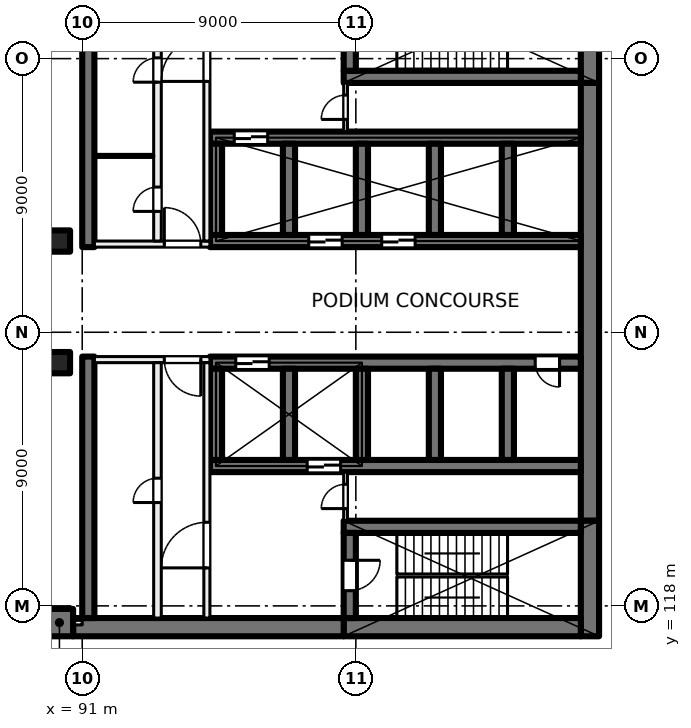
"""IFC4 building model, lengths in metres.
Left out: names, types, materials, properties, quantities, classifications, styles, units other than length and angle.
Written with IfcOpenShell. Run it as: python <this file> out.ifc"""

import sys

from ifc_helpers import new_model, si_unit, direction, frame, frame_2d, origin, origin_2d, place, context, subcontext, project, spatial, rectangle, extrude, element, fill, save


model = new_model("IFC4")
c1 = context("Model", 3, precision=1e-05, world=origin(), true_north=direction((0.0, 1.0)))
c2 = subcontext(c1, "Body", "Model", "MODEL_VIEW")
j1 = project(units=[si_unit("LENGTHUNIT", "METRE"), si_unit("PLANEANGLEUNIT", "RADIAN")], contexts=[c1])
p1 = place(None, origin())
s1 = spatial("IfcSite", under=j1, at=p1, CompositionType="ELEMENT")
p2 = place(p1, origin())
s2 = spatial("IfcBuilding", under=s1, at=p2, CompositionType="ELEMENT")
p3 = place(p2, frame((0.0, 0.0, 12.5)))
s3 = spatial("IfcBuildingStorey", under=s2, at=p3, CompositionType="ELEMENT", Elevation=12.5)
for number, where, z_axis, x_axis in (
    (1, (90.25, 130.0, 0.0), (0.0, 0.0, 1.0), (1.0, 0.0, 0.0)),
    (2, (90.25, 126.0, 0.0), (0.0, 0.0, 1.0), (1.0, 0.0, 0.0)),
):
    element("IfcColumn", number, at=place(p3, frame(where, z_axis=z_axis, x_axis=x_axis)), inside=s3, PredefinedType="COLUMN", context=c2, shape_type="SweptSolid", body=[
        extrude(rectangle(XDim=0.7, YDim=0.7, at=origin_2d()), origin(), (0.0, 0.0, 1.0), 5.0),
    ])
p4 = place(p3, frame((90.25, 117.45, 0.0), z_axis=(0.0, 0.0, 1.0), x_axis=(1.0, 0.0, 0.0)))
e3 = element("IfcColumn", 3, at=p4, inside=s3, PredefinedType="COLUMN", context=c2, shape_type="SweptSolid", body=[
    extrude(rectangle(XDim=0.9, YDim=0.9, at=origin_2d()), origin(), (0.0, 0.0, 1.0), 5.0),
])
p5 = place(p3, frame((107.7, 139.0, 0.0), z_axis=(0.0, 0.0, 1.0), x_axis=(0.0, -1.0, 0.0)))
e4 = element("IfcWall", 4, at=p5, inside=s3, PredefinedType="SHEAR", context=c2, shape_type="SweptSolid", body=[
    extrude(rectangle(XDim=3.8, YDim=0.6, at=frame_2d((1.9, 0.0))), origin(), (0.0, 0.0, 1.0), 5.0),
])
p6 = place(p3, frame((107.7, 135.2, 0.0), z_axis=(0.0, 0.0, 1.0), x_axis=(0.0, -1.0, 0.0)))
e5 = element("IfcWall", 5, at=p6, inside=s3, PredefinedType="SHEAR", context=c2, shape_type="SweptSolid", body=[
    extrude(rectangle(XDim=14.4, YDim=0.6, at=frame_2d((7.2, 0.0))), origin(), (0.0, 0.0, 1.0), 5.0),
])
p7 = place(p3, frame((107.7, 120.8, 0.0), z_axis=(0.0, 0.0, 1.0), x_axis=(0.0, -1.0, 0.0)))
e6 = element("IfcWall", 6, at=p7, inside=s3, PredefinedType="SHEAR", context=c2, shape_type="SweptSolid", body=[
    extrude(rectangle(XDim=3.8, YDim=0.6, at=frame_2d((1.9, 0.0))), origin(), (0.0, 0.0, 1.0), 5.0),
])
p8 = place(p3, frame((107.4, 117.3, 0.0), z_axis=(0.0, 0.0, 1.0), x_axis=(-1.0, 0.0, 0.0)))
e7 = element("IfcWall", 7, at=p8, inside=s3, PredefinedType="SHEAR", context=c2, shape_type="SweptSolid", body=[
    extrude(rectangle(XDim=7.8, YDim=0.6, at=frame_2d((3.9, 0.0))), origin(), (0.0, 0.0, 1.0), 5.0),
])
p9 = place(p3, frame((99.6, 117.3, 0.0), z_axis=(0.0, 0.0, 1.0), x_axis=(-1.0, 0.0, 0.0)))
e8 = element("IfcWall", 8, at=p9, inside=s3, PredefinedType="SHEAR", context=c2, shape_type="SweptSolid", body=[
    extrude(rectangle(XDim=8.9, YDim=0.6, at=frame_2d((4.45, 0.0))), origin(), (0.0, 0.0, 1.0), 5.0),
])
p10 = place(p3, frame((107.4, 135.4, 0.0), z_axis=(0.0, 0.0, 1.0), x_axis=(-1.0, 0.0, 0.0)))
e9 = element("IfcWall", 9, at=p10, inside=s3, PredefinedType="SHEAR", context=c2, shape_type="SweptSolid", body=[
    extrude(rectangle(XDim=7.8, YDim=0.4, at=frame_2d((3.9, 0.0))), origin(), (0.0, 0.0, 1.0), 5.0),
])
p11 = place(p3, frame((99.8, 138.4, 0.0), z_axis=(0.0, 0.0, 1.0), x_axis=(0.0, -1.0, 0.0)))
e10 = element("IfcWall", 10, at=p11, inside=s3, PredefinedType="SHEAR", context=c2, shape_type="SweptSolid", body=[
    extrude(rectangle(XDim=2.8, YDim=0.4, at=frame_2d((1.4, 0.0))), origin(), (0.0, 0.0, 1.0), 5.0),
])
p12 = place(p11, frame((0.9, 0.0, 0.0)))
e11 = element("IfcOpeningElement", 11, at=p12, cuts=e10, PredefinedType="OPENING", context=c2, shape_type="SweptSolid", body=[
    extrude(rectangle(XDim=1.0, YDim=2.1, at=frame_2d((0.5, 1.05))), frame((0.0, 0.21, 0.0), z_axis=(0.0, -1.0, 0.0), x_axis=(1.0, 0.0, 0.0)), (0.0, 0.0, 1.0), 0.42),
])
p13 = place(p3, frame((107.4, 120.6, 0.0), z_axis=(0.0, 0.0, 1.0), x_axis=(-1.0, 0.0, 0.0)))
e12 = element("IfcWall", 12, at=p13, inside=s3, PredefinedType="SHEAR", context=c2, shape_type="SweptSolid", body=[
    extrude(rectangle(XDim=7.8, YDim=0.4, at=frame_2d((3.9, 0.0))), origin(), (0.0, 0.0, 1.0), 5.0),
])
p14 = place(p3, frame((99.8, 120.4, 0.0), z_axis=(0.0, 0.0, 1.0), x_axis=(0.0, -1.0, 0.0)))
e13 = element("IfcWall", 13, at=p14, inside=s3, PredefinedType="SHEAR", context=c2, shape_type="SweptSolid", body=[
    extrude(rectangle(XDim=2.8, YDim=0.4, at=frame_2d((1.4, 0.0))), origin(), (0.0, 0.0, 1.0), 5.0),
])
p15 = place(p14, frame((0.9, 0.0, 0.0)))
e14 = element("IfcOpeningElement", 14, at=p15, cuts=e13, PredefinedType="OPENING", context=c2, shape_type="SweptSolid", body=[
    extrude(rectangle(XDim=1.0, YDim=2.1, at=frame_2d((0.5, 1.05))), frame((0.0, 0.21, 0.0), z_axis=(0.0, -1.0, 0.0), x_axis=(1.0, 0.0, 0.0)), (0.0, 0.0, 1.0), 0.42),
])
p16 = place(p3, frame((107.4, 130.0, 0.0), z_axis=(0.0, 0.0, 1.0), x_axis=(-1.0, 0.0, 0.0)))
e15 = element("IfcWall", 15, at=p16, inside=s3, PredefinedType="SHEAR", context=c2, shape_type="SweptSolid", body=[
    extrude(rectangle(XDim=12.2, YDim=0.4, at=frame_2d((6.1, 0.0))), origin(), (0.0, 0.0, 1.0), 5.0),
])
p17 = place(p16, frame((5.45, 0.0, 0.0)))
e16 = element("IfcOpeningElement", 16, at=p17, cuts=e15, PredefinedType="OPENING", context=c2, shape_type="SweptSolid", body=[
    extrude(rectangle(XDim=1.1, YDim=2.1, at=frame_2d((0.55, 1.05))), frame((0.0, 0.21, 0.0), z_axis=(0.0, -1.0, 0.0), x_axis=(1.0, 0.0, 0.0)), (0.0, 0.0, 1.0), 0.42),
])
p18 = place(p16, frame((7.85, 0.0, 0.0)))
e17 = element("IfcOpeningElement", 17, at=p18, cuts=e15, PredefinedType="OPENING", context=c2, shape_type="SweptSolid", body=[
    extrude(rectangle(XDim=1.1, YDim=2.1, at=frame_2d((0.55, 1.05))), frame((0.0, 0.21, 0.0), z_axis=(0.0, -1.0, 0.0), x_axis=(1.0, 0.0, 0.0)), (0.0, 0.0, 1.0), 0.42),
])
p19 = place(p3, frame((107.4, 133.4, 0.0), z_axis=(0.0, 0.0, 1.0), x_axis=(-1.0, 0.0, 0.0)))
e18 = element("IfcWall", 18, at=p19, inside=s3, PredefinedType="SHEAR", context=c2, shape_type="SweptSolid", body=[
    extrude(rectangle(XDim=12.2, YDim=0.4, at=frame_2d((6.1, 0.0))), origin(), (0.0, 0.0, 1.0), 5.0),
])
p20 = place(p19, frame((10.3, 0.0, 0.0)))
e19 = element("IfcOpeningElement", 19, at=p20, cuts=e18, PredefinedType="OPENING", context=c2, shape_type="SweptSolid", body=[
    extrude(rectangle(XDim=1.1, YDim=2.1, at=frame_2d((0.55, 1.05))), frame((0.0, 0.21, 0.0), z_axis=(0.0, -1.0, 0.0), x_axis=(1.0, 0.0, 0.0)), (0.0, 0.0, 1.0), 0.42),
])
for number, where, z_axis, x_axis in (
    (20, (105.0, 133.2, 0.0), (0.0, 0.0, 1.0), (0.0, -1.0, 0.0)),
    (21, (102.6, 133.2, 0.0), (0.0, 0.0, 1.0), (0.0, -1.0, 0.0)),
    (22, (100.2, 133.2, 0.0), (0.0, 0.0, 1.0), (0.0, -1.0, 0.0)),
    (23, (97.8, 133.2, 0.0), (0.0, 0.0, 1.0), (0.0, -1.0, 0.0)),
    (24, (95.4, 133.2, 0.0), (0.0, 0.0, 1.0), (0.0, -1.0, 0.0)),
):
    element("IfcWall", number, at=place(p3, frame(where, z_axis=z_axis, x_axis=x_axis)), inside=s3, PredefinedType="SHEAR", context=c2, shape_type="SweptSolid", body=[
        extrude(rectangle(XDim=3.0, YDim=0.4, at=frame_2d((1.5, 0.0))), origin(), (0.0, 0.0, 1.0), 5.0),
    ])
p21 = place(p3, frame((107.4, 126.0, 0.0), z_axis=(0.0, 0.0, 1.0), x_axis=(-1.0, 0.0, 0.0)))
e25 = element("IfcWall", 25, at=p21, inside=s3, PredefinedType="SHEAR", context=c2, shape_type="SweptSolid", body=[
    extrude(rectangle(XDim=12.2, YDim=0.4, at=frame_2d((6.1, 0.0))), origin(), (0.0, 0.0, 1.0), 5.0),
])
p22 = place(p21, frame((10.25, 0.0, 0.0)))
e26 = element("IfcOpeningElement", 26, at=p22, cuts=e25, PredefinedType="OPENING", context=c2, shape_type="SweptSolid", body=[
    extrude(rectangle(XDim=1.1, YDim=2.1, at=frame_2d((0.55, 1.05))), frame((0.0, 0.21, 0.0), z_axis=(0.0, -1.0, 0.0), x_axis=(1.0, 0.0, 0.0)), (0.0, 0.0, 1.0), 0.42),
])
p23 = place(p21, frame((0.7, 0.0, 0.0)))
e27 = element("IfcOpeningElement", 27, at=p23, cuts=e25, PredefinedType="OPENING", context=c2, shape_type="SweptSolid", body=[
    extrude(rectangle(XDim=0.8, YDim=2.1, at=frame_2d((0.4, 1.05))), frame((0.0, 0.21, 0.0), z_axis=(0.0, -1.0, 0.0), x_axis=(1.0, 0.0, 0.0)), (0.0, 0.0, 1.0), 0.42),
])
p24 = place(p3, frame((107.4, 122.6, 0.0), z_axis=(0.0, 0.0, 1.0), x_axis=(-1.0, 0.0, 0.0)))
e28 = element("IfcWall", 28, at=p24, inside=s3, PredefinedType="SHEAR", context=c2, shape_type="SweptSolid", body=[
    extrude(rectangle(XDim=12.2, YDim=0.4, at=frame_2d((6.1, 0.0))), origin(), (0.0, 0.0, 1.0), 5.0),
])
p25 = place(p24, frame((7.9, 0.0, 0.0)))
e29 = element("IfcOpeningElement", 29, at=p25, cuts=e28, PredefinedType="OPENING", context=c2, shape_type="SweptSolid", body=[
    extrude(rectangle(XDim=1.1, YDim=2.1, at=frame_2d((0.55, 1.05))), frame((0.0, 0.21, 0.0), z_axis=(0.0, -1.0, 0.0), x_axis=(1.0, 0.0, 0.0)), (0.0, 0.0, 1.0), 0.42),
])
for number, where, z_axis, x_axis in (
    (30, (105.0, 125.8, 0.0), (0.0, 0.0, 1.0), (0.0, -1.0, 0.0)),
    (31, (102.6, 125.8, 0.0), (0.0, 0.0, 1.0), (0.0, -1.0, 0.0)),
    (32, (100.2, 125.8, 0.0), (0.0, 0.0, 1.0), (0.0, -1.0, 0.0)),
    (33, (97.8, 125.8, 0.0), (0.0, 0.0, 1.0), (0.0, -1.0, 0.0)),
    (34, (95.4, 125.8, 0.0), (0.0, 0.0, 1.0), (0.0, -1.0, 0.0)),
):
    element("IfcWall", number, at=place(p3, frame(where, z_axis=z_axis, x_axis=x_axis)), inside=s3, PredefinedType="SHEAR", context=c2, shape_type="SweptSolid", body=[
        extrude(rectangle(XDim=3.0, YDim=0.4, at=frame_2d((1.5, 0.0))), origin(), (0.0, 0.0, 1.0), 5.0),
    ])
for number, where, z_axis, x_axis in (
    (35, (91.2, 138.4, 0.0), (0.0, 0.0, 1.0), (0.0, -1.0, 0.0)),
    (36, (91.2, 126.2, 0.0), (0.0, 0.0, 1.0), (0.0, -1.0, 0.0)),
):
    element("IfcWall", number, at=place(p3, frame(where, z_axis=z_axis, x_axis=x_axis)), inside=s3, PredefinedType="SHEAR", context=c2, shape_type="SweptSolid", body=[
        extrude(rectangle(XDim=8.6, YDim=0.4, at=frame_2d((4.3, 0.0))), origin(), (0.0, 0.0, 1.0), 5.0),
    ])
p26 = place(p3, frame((95.2, 126.1, 0.0), z_axis=(0.0, 0.0, 1.0), x_axis=(-1.0, 0.0, 0.0)))
e37 = element("IfcWall", 37, at=p26, inside=s3, PredefinedType="PARTITIONING", context=c2, shape_type="SweptSolid", body=[
    extrude(rectangle(XDim=3.8, YDim=0.2, at=frame_2d((1.9, 0.0))), origin(), (0.0, 0.0, 1.0), 4.6),
])
p27 = place(p26, frame((0.3, 0.0, 0.0)))
e38 = element("IfcOpeningElement", 38, at=p27, cuts=e37, PredefinedType="OPENING", context=c2, shape_type="SweptSolid", body=[
    extrude(rectangle(XDim=1.2, YDim=2.1, at=frame_2d((0.6, 1.05))), frame((0.0, 0.11, 0.0), z_axis=(0.0, -1.0, 0.0), x_axis=(1.0, 0.0, 0.0)), (0.0, 0.0, 1.0), 0.22),
])
p28 = place(p3, frame((95.1, 117.6, 0.0), z_axis=(0.0, 0.0, 1.0), x_axis=(0.0, 1.0, 0.0)))
e39 = element("IfcWall", 39, at=p28, inside=s3, PredefinedType="PARTITIONING", context=c2, shape_type="SweptSolid", body=[
    extrude(rectangle(XDim=8.4, YDim=0.2, at=frame_2d((4.2, 0.0))), origin(), (0.0, 0.0, 1.0), 4.6),
])
p29 = place(p28, frame((1.65, 0.0, 0.0)))
e40 = element("IfcOpeningElement", 40, at=p29, cuts=e39, PredefinedType="OPENING", context=c2, shape_type="SweptSolid", body=[
    extrude(rectangle(XDim=1.5, YDim=2.1, at=frame_2d((0.75, 1.05))), frame((0.0, 0.11, 0.0), z_axis=(0.0, -1.0, 0.0), x_axis=(1.0, 0.0, 0.0)), (0.0, 0.0, 1.0), 0.22),
])
p30 = place(p3, frame((93.475, 117.6, 0.0), z_axis=(0.0, 0.0, 1.0), x_axis=(0.0, 1.0, 0.0)))
e41 = element("IfcWall", 41, at=p30, inside=s3, PredefinedType="PARTITIONING", context=c2, shape_type="SweptSolid", body=[
    extrude(rectangle(XDim=8.4, YDim=0.25, at=frame_2d((4.2, 0.0))), origin(), (0.0, 0.0, 1.0), 4.6),
])
p31 = place(p30, frame((3.8, 0.0, 0.0)))
e42 = element("IfcOpeningElement", 42, at=p31, cuts=e41, PredefinedType="OPENING", context=c2, shape_type="SweptSolid", body=[
    extrude(rectangle(XDim=0.8, YDim=2.1, at=frame_2d((0.4, 1.05))), frame((0.0, 0.135, 0.0), z_axis=(0.0, -1.0, 0.0), x_axis=(1.0, 0.0, 0.0)), (0.0, 0.0, 1.0), 0.27),
])
p32 = place(p3, frame((99.663, 120.8, 0.0), z_axis=(0.0, 0.0, 1.0), x_axis=(0.0, 1.0, 0.0)))
e43 = element("IfcWall", 43, at=p32, inside=s3, PredefinedType="PARTITIONING", context=c2, shape_type="SweptSolid", body=[
    extrude(rectangle(XDim=1.6, YDim=0.125, at=frame_2d((0.8, 0.0))), origin(), (0.0, 0.0, 1.0), 4.6),
])
p33 = place(p32, frame((0.4, 0.0, 0.0)))
e44 = element("IfcOpeningElement", 44, at=p33, cuts=e43, PredefinedType="OPENING", context=c2, shape_type="SweptSolid", body=[
    extrude(rectangle(XDim=0.8, YDim=2.1, at=frame_2d((0.4, 1.05))), frame((0.0, 0.073, 0.0), z_axis=(0.0, -1.0, 0.0), x_axis=(1.0, 0.0, 0.0)), (0.0, 0.0, 1.0), 0.145),
])
p34 = place(p3, frame((91.4, 129.9, 0.0), z_axis=(0.0, 0.0, 1.0), x_axis=(1.0, 0.0, 0.0)))
e45 = element("IfcWall", 45, at=p34, inside=s3, PredefinedType="PARTITIONING", context=c2, shape_type="SweptSolid", body=[
    extrude(rectangle(XDim=3.8, YDim=0.2, at=frame_2d((1.9, 0.0))), origin(), (0.0, 0.0, 1.0), 4.6),
])
p35 = place(p34, frame((2.3, 0.0, 0.0)))
e46 = element("IfcOpeningElement", 46, at=p35, cuts=e45, PredefinedType="OPENING", context=c2, shape_type="SweptSolid", body=[
    extrude(rectangle(XDim=1.2, YDim=2.1, at=frame_2d((0.6, 1.05))), frame((0.0, 0.11, 0.0), z_axis=(0.0, -1.0, 0.0), x_axis=(1.0, 0.0, 0.0)), (0.0, 0.0, 1.0), 0.22),
])
p36 = place(p3, frame((95.1, 130.0, 0.0), z_axis=(0.0, 0.0, 1.0), x_axis=(0.0, 1.0, 0.0)))
e47 = element("IfcWall", 47, at=p36, inside=s3, PredefinedType="PARTITIONING", context=c2, shape_type="SweptSolid", body=[
    extrude(rectangle(XDim=8.4, YDim=0.2, at=frame_2d((4.2, 0.0))), origin(), (0.0, 0.0, 1.0), 4.6),
])
p37 = place(p36, frame((5.25, 0.0, 0.0)))
e48 = element("IfcOpeningElement", 48, at=p37, cuts=e47, PredefinedType="OPENING", context=c2, shape_type="SweptSolid", body=[
    extrude(rectangle(XDim=1.5, YDim=2.1, at=frame_2d((0.75, 1.05))), frame((0.0, 0.11, 0.0), z_axis=(0.0, -1.0, 0.0), x_axis=(1.0, 0.0, 0.0)), (0.0, 0.0, 1.0), 0.22),
])
p38 = place(p3, frame((93.475, 130.0, 0.0), z_axis=(0.0, 0.0, 1.0), x_axis=(0.0, 1.0, 0.0)))
e49 = element("IfcWall", 49, at=p38, inside=s3, PredefinedType="PARTITIONING", context=c2, shape_type="SweptSolid", body=[
    extrude(rectangle(XDim=8.4, YDim=0.25, at=frame_2d((4.2, 0.0))), origin(), (0.0, 0.0, 1.0), 4.6),
])
p39 = place(p38, frame((0.975, 0.0, 0.0)))
e50 = element("IfcOpeningElement", 50, at=p39, cuts=e49, PredefinedType="OPENING", context=c2, shape_type="SweptSolid", body=[
    extrude(rectangle(XDim=0.8, YDim=2.1, at=frame_2d((0.4, 1.05))), frame((0.0, 0.135, 0.0), z_axis=(0.0, -1.0, 0.0), x_axis=(1.0, 0.0, 0.0)), (0.0, 0.0, 1.0), 0.27),
])
p40 = place(p38, frame((5.225, 0.0, 0.0)))
e51 = element("IfcOpeningElement", 51, at=p40, cuts=e49, PredefinedType="OPENING", context=c2, shape_type="SweptSolid", body=[
    extrude(rectangle(XDim=0.8, YDim=2.1, at=frame_2d((0.4, 1.05))), frame((0.0, 0.135, 0.0), z_axis=(0.0, -1.0, 0.0), x_axis=(1.0, 0.0, 0.0)), (0.0, 0.0, 1.0), 0.27),
])
p41 = place(p3, frame((99.663, 133.6, 0.0), z_axis=(0.0, 0.0, 1.0), x_axis=(0.0, 1.0, 0.0)))
e52 = element("IfcWall", 52, at=p41, inside=s3, PredefinedType="PARTITIONING", context=c2, shape_type="SweptSolid", body=[
    extrude(rectangle(XDim=1.6, YDim=0.125, at=frame_2d((0.8, 0.0))), origin(), (0.0, 0.0, 1.0), 4.6),
])
p42 = place(p41, frame((0.4, 0.0, 0.0)))
e53 = element("IfcOpeningElement", 53, at=p42, cuts=e52, PredefinedType="OPENING", context=c2, shape_type="SweptSolid", body=[
    extrude(rectangle(XDim=0.8, YDim=2.1, at=frame_2d((0.4, 1.05))), frame((0.0, 0.073, 0.0), z_axis=(0.0, -1.0, 0.0), x_axis=(1.0, 0.0, 0.0)), (0.0, 0.0, 1.0), 0.145),
])
p43 = place(p3, frame((91.4, 132.8, 0.0), z_axis=(0.0, 0.0, 1.0), x_axis=(1.0, 0.0, 0.0)))
e54 = element("IfcWall", 54, at=p43, inside=s3, PredefinedType="PARTITIONING", context=c2, shape_type="SweptSolid", body=[
    extrude(rectangle(XDim=1.95, YDim=0.1, at=frame_2d((0.975, 0.0))), origin(), (0.0, 0.0, 1.0), 4.6),
])
p44 = place(p3, frame((49.825, 117.45, 0.0), z_axis=(0.0, 0.0, 1.0), x_axis=(1.0, 0.0, 0.0)))
e55 = element("IfcWall", 55, at=p44, inside=s3, PredefinedType="PARTITIONING", context=c2, shape_type="SweptSolid", body=[
    extrude(rectangle(XDim=41.175, YDim=0.15, at=frame_2d((20.587, 0.0))), origin(), (0.0, 0.0, 1.0), 4.6),
])
p45 = place(p22, origin())
e56 = element("IfcDoor", 56, at=p45, inside=s3, OperationType="DOUBLE_DOOR_SLIDING", PredefinedType="DOOR", context=c2, shape_type="SweptSolid", body=[
    extrude(rectangle(XDim=1.1, YDim=2.1, at=frame_2d((0.55, 1.05))), frame((0.0, 0.025, 0.0), z_axis=(0.0, -1.0, 0.0), x_axis=(1.0, 0.0, 0.0)), (0.0, 0.0, 1.0), 0.05),
])
fill(e26, e56)
p46 = place(p17, origin())
e57 = element("IfcDoor", 57, at=p46, inside=s3, OperationType="DOUBLE_DOOR_SLIDING", PredefinedType="DOOR", context=c2, shape_type="SweptSolid", body=[
    extrude(rectangle(XDim=1.1, YDim=2.1, at=frame_2d((0.55, 1.05))), frame((0.0, 0.025, 0.0), z_axis=(0.0, -1.0, 0.0), x_axis=(1.0, 0.0, 0.0)), (0.0, 0.0, 1.0), 0.05),
])
fill(e16, e57)
p47 = place(p18, origin())
e58 = element("IfcDoor", 58, at=p47, inside=s3, OperationType="DOUBLE_DOOR_SLIDING", PredefinedType="DOOR", context=c2, shape_type="SweptSolid", body=[
    extrude(rectangle(XDim=1.1, YDim=2.1, at=frame_2d((0.55, 1.05))), frame((0.0, 0.025, 0.0), z_axis=(0.0, -1.0, 0.0), x_axis=(1.0, 0.0, 0.0)), (0.0, 0.0, 1.0), 0.05),
])
fill(e17, e58)
p48 = place(p23, origin())
e59 = element("IfcDoor", 59, at=p48, inside=s3, OperationType="SINGLE_SWING_LEFT", PredefinedType="DOOR", context=c2, shape_type="SweptSolid", body=[
    extrude(rectangle(XDim=0.8, YDim=2.1, at=frame_2d((0.4, 1.05))), frame((0.0, 0.025, 0.0), z_axis=(0.0, -1.0, 0.0), x_axis=(1.0, 0.0, 0.0)), (0.0, 0.0, 1.0), 0.05),
])
fill(e27, e59)
p49 = place(p27, origin())
e60 = element("IfcDoor", 60, at=p49, inside=s3, OperationType="DOUBLE_DOOR_SINGLE_SWING", PredefinedType="DOOR", context=c2, shape_type="SweptSolid", body=[
    extrude(rectangle(XDim=1.2, YDim=2.1, at=frame_2d((0.6, 1.05))), frame((0.0, 0.025, 0.0), z_axis=(0.0, -1.0, 0.0), x_axis=(1.0, 0.0, 0.0)), (0.0, 0.0, 1.0), 0.05),
])
fill(e38, e60)
p50 = place(p29, origin())
e61 = element("IfcDoor", 61, at=p50, inside=s3, OperationType="DOUBLE_DOOR_SINGLE_SWING", PredefinedType="DOOR", context=c2, shape_type="SweptSolid", body=[
    extrude(rectangle(XDim=1.5, YDim=2.1, at=frame_2d((0.75, 1.05))), frame((0.0, 0.025, 0.0), z_axis=(0.0, -1.0, 0.0), x_axis=(1.0, 0.0, 0.0)), (0.0, 0.0, 1.0), 0.05),
])
fill(e40, e61)
p51 = place(p15, origin())
e62 = element("IfcDoor", 62, at=p51, inside=s3, OperationType="SINGLE_SWING_LEFT", PredefinedType="DOOR", context=c2, shape_type="SweptSolid", body=[
    extrude(rectangle(XDim=1.0, YDim=2.1, at=frame_2d((0.5, 1.05))), frame((0.0, 0.025, 0.0), z_axis=(0.0, -1.0, 0.0), x_axis=(1.0, 0.0, 0.0)), (0.0, 0.0, 1.0), 0.05),
])
fill(e14, e62)
p52 = place(p33, origin())
e63 = element("IfcDoor", 63, at=p52, inside=s3, OperationType="SINGLE_SWING_RIGHT", PredefinedType="DOOR", context=c2, shape_type="SweptSolid", body=[
    extrude(rectangle(XDim=0.8, YDim=2.1, at=frame_2d((0.4, 1.05))), frame((0.0, 0.025, 0.0), z_axis=(0.0, -1.0, 0.0), x_axis=(1.0, 0.0, 0.0)), (0.0, 0.0, 1.0), 0.05),
])
fill(e44, e63)
p53 = place(p31, origin())
e64 = element("IfcDoor", 64, at=p53, inside=s3, OperationType="SINGLE_SWING_LEFT", PredefinedType="DOOR", context=c2, shape_type="SweptSolid", body=[
    extrude(rectangle(XDim=0.8, YDim=2.1, at=frame_2d((0.4, 1.05))), frame((0.0, 0.025, 0.0), z_axis=(0.0, -1.0, 0.0), x_axis=(1.0, 0.0, 0.0)), (0.0, 0.0, 1.0), 0.05),
])
fill(e42, e64)
p54 = place(p35, origin())
e65 = element("IfcDoor", 65, at=p54, inside=s3, OperationType="DOUBLE_DOOR_SINGLE_SWING", PredefinedType="DOOR", context=c2, shape_type="SweptSolid", body=[
    extrude(rectangle(XDim=1.2, YDim=2.1, at=frame_2d((0.6, 1.05))), frame((0.0, 0.025, 0.0), z_axis=(0.0, -1.0, 0.0), x_axis=(1.0, 0.0, 0.0)), (0.0, 0.0, 1.0), 0.05),
])
fill(e46, e65)
p55 = place(p37, origin())
e66 = element("IfcDoor", 66, at=p55, inside=s3, OperationType="DOUBLE_DOOR_SINGLE_SWING", PredefinedType="DOOR", context=c2, shape_type="SweptSolid", body=[
    extrude(rectangle(XDim=1.5, YDim=2.1, at=frame_2d((0.75, 1.05))), frame((0.0, 0.025, 0.0), z_axis=(0.0, -1.0, 0.0), x_axis=(1.0, 0.0, 0.0)), (0.0, 0.0, 1.0), 0.05),
])
fill(e48, e66)
p56 = place(p42, origin())
e67 = element("IfcDoor", 67, at=p56, inside=s3, OperationType="SINGLE_SWING_LEFT", PredefinedType="DOOR", context=c2, shape_type="SweptSolid", body=[
    extrude(rectangle(XDim=0.8, YDim=2.1, at=frame_2d((0.4, 1.05))), frame((0.0, 0.025, 0.0), z_axis=(0.0, -1.0, 0.0), x_axis=(1.0, 0.0, 0.0)), (0.0, 0.0, 1.0), 0.05),
])
fill(e53, e67)
p57 = place(p39, origin())
e68 = element("IfcDoor", 68, at=p57, inside=s3, OperationType="SINGLE_SWING_RIGHT", PredefinedType="DOOR", context=c2, shape_type="SweptSolid", body=[
    extrude(rectangle(XDim=0.8, YDim=2.1, at=frame_2d((0.4, 1.05))), frame((0.0, 0.025, 0.0), z_axis=(0.0, -1.0, 0.0), x_axis=(1.0, 0.0, 0.0)), (0.0, 0.0, 1.0), 0.05),
])
fill(e50, e68)
p58 = place(p40, origin())
e69 = element("IfcDoor", 69, at=p58, inside=s3, OperationType="SINGLE_SWING_LEFT", PredefinedType="DOOR", context=c2, shape_type="SweptSolid", body=[
    extrude(rectangle(XDim=0.8, YDim=2.1, at=frame_2d((0.4, 1.05))), frame((0.0, 0.025, 0.0), z_axis=(0.0, -1.0, 0.0), x_axis=(1.0, 0.0, 0.0)), (0.0, 0.0, 1.0), 0.05),
])
fill(e51, e69)
p59 = place(p20, origin())
e70 = element("IfcDoor", 70, at=p59, inside=s3, OperationType="DOUBLE_DOOR_SLIDING", PredefinedType="DOOR", context=c2, shape_type="SweptSolid", body=[
    extrude(rectangle(XDim=1.1, YDim=2.1, at=frame_2d((0.55, 1.05))), frame((0.0, 0.025, 0.0), z_axis=(0.0, -1.0, 0.0), x_axis=(1.0, 0.0, 0.0)), (0.0, 0.0, 1.0), 0.05),
])
fill(e19, e70)
p60 = place(p25, origin())
e71 = element("IfcDoor", 71, at=p60, inside=s3, OperationType="DOUBLE_DOOR_SLIDING", PredefinedType="DOOR", context=c2, shape_type="SweptSolid", body=[
    extrude(rectangle(XDim=1.1, YDim=2.1, at=frame_2d((0.55, 1.05))), frame((0.0, 0.025, 0.0), z_axis=(0.0, -1.0, 0.0), x_axis=(1.0, 0.0, 0.0)), (0.0, 0.0, 1.0), 0.05),
])
fill(e29, e71)
save(model, sys.argv[1])
